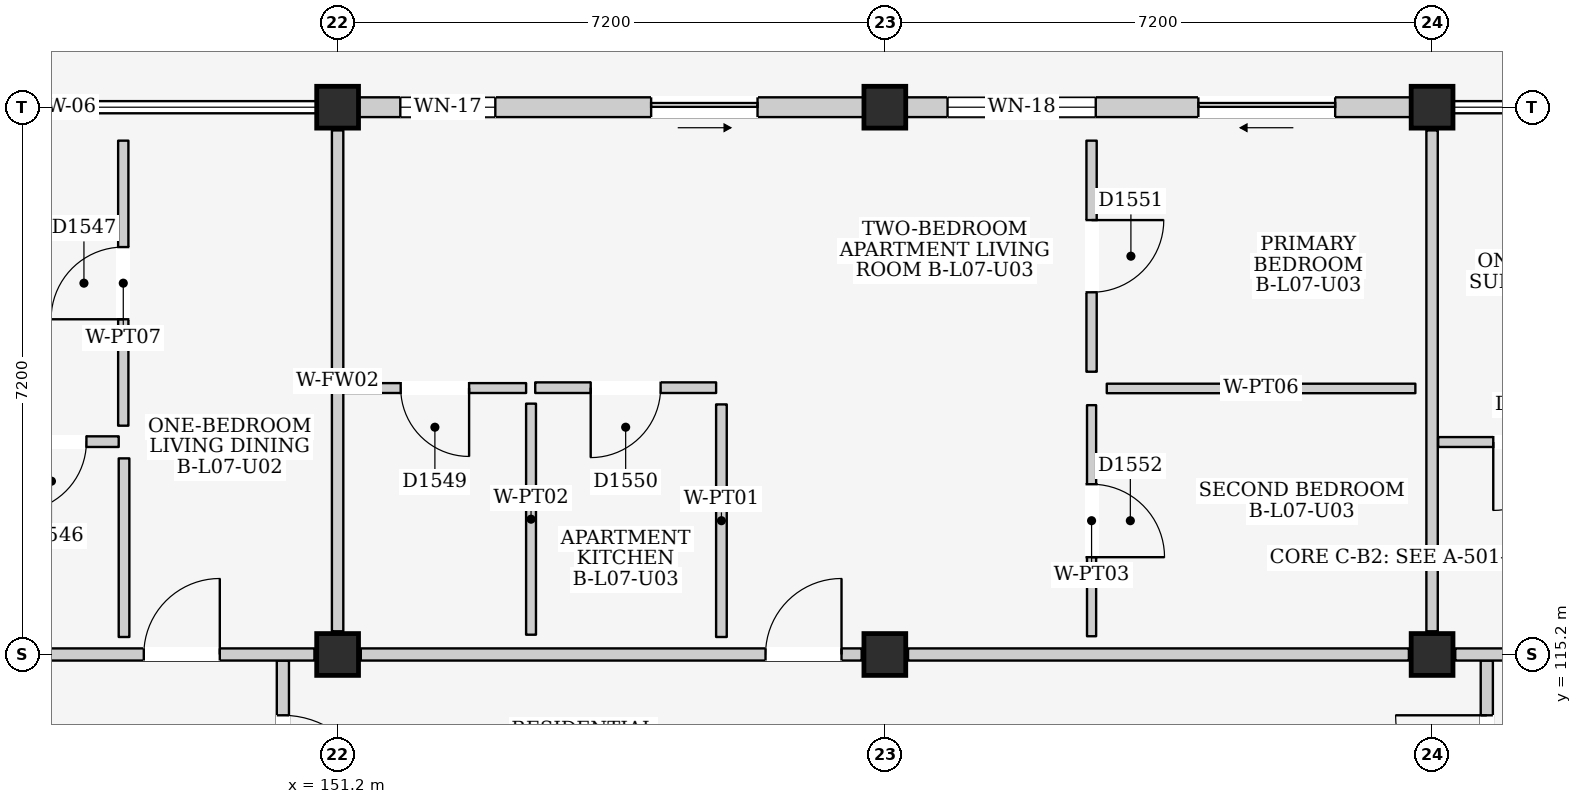
"""IFC4 building model, lengths in metres.
Left out: names, types, materials, properties, quantities, classifications, styles, units other than length and angle.
Written with IfcOpenShell. Run it as: python <this file> out.ifc"""

import sys

from ifc_helpers import new_model, si_unit, direction, frame, frame_2d, origin, origin_2d, place, context, subcontext, project, spatial, rectangle, extrude, element, fill, save


model = new_model("IFC4")
c1 = context("Model", 3, precision=1e-05, world=origin(), true_north=direction((0.0, 1.0)))
c2 = subcontext(c1, "Body", "Model", "MODEL_VIEW")
j1 = project(units=[si_unit("LENGTHUNIT", "METRE"), si_unit("PLANEANGLEUNIT", "RADIAN")], contexts=[c1])
p1 = place(None, origin())
s1 = spatial("IfcSite", under=j1, at=p1, CompositionType="ELEMENT")
p2 = place(p1, origin())
s2 = spatial("IfcBuilding", under=s1, at=p2, CompositionType="ELEMENT")
p3 = place(p2, frame((0.0, 0.0, 25.1)))
s3 = spatial("IfcBuildingStorey", under=s2, at=p3, CompositionType="ELEMENT", Elevation=25.1)
for number, where, z_axis, x_axis in (
    (1, (151.2, 115.2, 0.0), (0.0, 0.0, 1.0), (1.0, 0.0, 0.0)),
    (2, (151.2, 122.4, 0.0), (0.0, 0.0, 1.0), (1.0, 0.0, 0.0)),
    (3, (158.4, 115.2, 0.0), (0.0, 0.0, 1.0), (1.0, 0.0, 0.0)),
    (4, (158.4, 122.4, 0.0), (0.0, 0.0, 1.0), (1.0, 0.0, 0.0)),
    (5, (165.6, 115.2, 0.0), (0.0, 0.0, 1.0), (1.0, 0.0, 0.0)),
    (6, (165.6, 122.4, 0.0), (0.0, 0.0, 1.0), (1.0, 0.0, 0.0)),
):
    element("IfcColumn", number, at=place(p3, frame(where, z_axis=z_axis, x_axis=x_axis)), inside=s3, PredefinedType="COLUMN", context=c2, shape_type="SweptSolid", body=[
        extrude(rectangle(XDim=0.55, YDim=0.55, at=origin_2d()), origin(), (0.0, 0.0, 1.0), 3.2),
    ])
p4 = place(p3, frame((151.475, 122.4, 0.0), z_axis=(0.0, 0.0, 1.0), x_axis=(1.0, 0.0, 0.0)))
e7 = element("IfcWall", 7, at=p4, inside=s3, PredefinedType="ELEMENTEDWALL", context=c2, shape_type="SweptSolid", body=[
    extrude(rectangle(XDim=6.65, YDim=0.26, at=frame_2d((3.325, 0.0))), origin(), (0.0, 0.0, 1.0), 2.525),
])
p5 = place(p4, frame((3.85, 0.0, 0.0)))
e8 = element("IfcOpeningElement", 8, at=p5, cuts=e7, PredefinedType="OPENING", context=c2, shape_type="SweptSolid", body=[
    extrude(rectangle(XDim=1.4, YDim=2.1, at=frame_2d((0.7, 1.05))), frame((0.0, 0.145, 0.0), z_axis=(0.0, -1.0, 0.0), x_axis=(1.0, 0.0, 0.0)), (0.0, 0.0, 1.0), 0.29),
])
p6 = place(p4, frame((0.55, 0.0, 0.9)))
e9 = element("IfcOpeningElement", 9, at=p6, cuts=e7, PredefinedType="OPENING", context=c2, shape_type="SweptSolid", body=[
    extrude(rectangle(XDim=1.25, YDim=1.3, at=frame_2d((0.625, 0.65))), frame((0.0, 0.145, 0.0), z_axis=(0.0, -1.0, 0.0), x_axis=(1.0, 0.0, 0.0)), (0.0, 0.0, 1.0), 0.29),
])
p7 = place(p3, frame((158.675, 122.4, 0.0), z_axis=(0.0, 0.0, 1.0), x_axis=(1.0, 0.0, 0.0)))
e10 = element("IfcWall", 10, at=p7, inside=s3, PredefinedType="ELEMENTEDWALL", context=c2, shape_type="SweptSolid", body=[
    extrude(rectangle(XDim=6.65, YDim=0.26, at=frame_2d((3.325, 0.0))), origin(), (0.0, 0.0, 1.0), 2.525),
])
p8 = place(p7, frame((3.85, 0.0, 0.0)))
e11 = element("IfcOpeningElement", 11, at=p8, cuts=e10, PredefinedType="OPENING", context=c2, shape_type="SweptSolid", body=[
    extrude(rectangle(XDim=1.8, YDim=2.12, at=frame_2d((0.9, 1.06))), frame((0.0, 0.145, 0.0), z_axis=(0.0, -1.0, 0.0), x_axis=(1.0, 0.0, 0.0)), (0.0, 0.0, 1.0), 0.29),
])
p9 = place(p7, frame((0.55, 0.0, 0.865)))
e12 = element("IfcOpeningElement", 12, at=p9, cuts=e10, PredefinedType="OPENING", context=c2, shape_type="SweptSolid", body=[
    extrude(rectangle(XDim=1.95, YDim=1.55, at=frame_2d((0.975, 0.775))), frame((0.0, 0.145, 0.0), z_axis=(0.0, -1.0, 0.0), x_axis=(1.0, 0.0, 0.0)), (0.0, 0.0, 1.0), 0.29),
])
p10 = place(p3, frame((150.48, 111.1, 0.0), z_axis=(0.0, 0.0, 1.0), x_axis=(0.0, 1.0, 0.0)))
e13 = element("IfcWall", 13, at=p10, inside=s3, PredefinedType="PARTITIONING", context=c2, shape_type="SweptSolid", body=[
    extrude(rectangle(XDim=4.02, YDim=0.16, at=frame_2d((2.01, 0.0))), origin(), (0.0, 0.0, 1.0), 2.99),
])
p11 = place(p10, frame((2.1, 0.0, 0.0)))
e14 = element("IfcOpeningElement", 14, at=p11, cuts=e13, PredefinedType="OPENING", context=c2, shape_type="SweptSolid", body=[
    extrude(rectangle(XDim=1.2, YDim=2.2, at=frame_2d((0.6, 1.1))), frame((0.0, 0.095, 0.0), z_axis=(0.0, -1.0, 0.0), x_axis=(1.0, 0.0, 0.0)), (0.0, 0.0, 1.0), 0.19),
])
p12 = place(p3, frame((166.32, 110.8, 0.0), z_axis=(0.0, 0.0, 1.0), x_axis=(0.0, 1.0, 0.0)))
e15 = element("IfcWall", 15, at=p12, inside=s3, PredefinedType="PARTITIONING", context=c2, shape_type="SweptSolid", body=[
    extrude(rectangle(XDim=4.32, YDim=0.16, at=frame_2d((2.16, 0.0))), origin(), (0.0, 0.0, 1.0), 2.99),
])
p13 = place(p12, frame((2.4, 0.0, 0.0)))
e16 = element("IfcOpeningElement", 16, at=p13, cuts=e15, PredefinedType="OPENING", context=c2, shape_type="SweptSolid", body=[
    extrude(rectangle(XDim=1.2, YDim=2.2, at=frame_2d((0.6, 1.1))), frame((0.0, 0.095, 0.0), z_axis=(0.0, -1.0, 0.0), x_axis=(1.0, 0.0, 0.0)), (0.0, 0.0, 1.0), 0.19),
])
p14 = place(p3, frame((144.305, 115.2, 0.0), z_axis=(0.0, 0.0, 1.0), x_axis=(1.0, 0.0, 0.0)))
e17 = element("IfcWall", 17, at=p14, inside=s3, PredefinedType="PARTITIONING", context=c2, shape_type="SweptSolid", body=[
    extrude(rectangle(XDim=6.59, YDim=0.16, at=frame_2d((3.295, 0.0))), origin(), (0.0, 0.0, 1.0), 2.375),
])
p15 = place(p14, frame((4.345, 0.0, 0.0)))
e18 = element("IfcOpeningElement", 18, at=p15, cuts=e17, PredefinedType="OPENING", context=c2, shape_type="SweptSolid", body=[
    extrude(rectangle(XDim=1.0, YDim=2.15, at=frame_2d((0.5, 1.075))), frame((0.0, 0.095, 0.0), z_axis=(0.0, -1.0, 0.0), x_axis=(1.0, 0.0, 0.0)), (0.0, 0.0, 1.0), 0.19),
])
p16 = place(p3, frame((151.2, 115.505, 0.0), z_axis=(0.0, 0.0, 1.0), x_axis=(0.0, 1.0, 0.0)))
e19 = element("IfcWall", 19, at=p16, inside=s3, PredefinedType="PARTITIONING", context=c2, shape_type="SweptSolid", body=[
    extrude(rectangle(XDim=6.59, YDim=0.15, at=frame_2d((3.295, 0.0))), origin(), (0.0, 0.0, 1.0), 2.475),
])
p17 = place(p3, frame((146.55, 118.0, 0.0), z_axis=(0.0, 0.0, 1.0), x_axis=(1.0, 0.0, 0.0)))
e20 = element("IfcWall", 20, at=p17, inside=s3, PredefinedType="PARTITIONING", context=c2, shape_type="SweptSolid", body=[
    extrude(rectangle(XDim=1.77, YDim=0.14, at=frame_2d((0.885, 0.0))), origin(), (0.0, 0.0, 1.0), 2.99),
])
p18 = place(p17, frame((0.425, 0.0, 0.0)))
e21 = element("IfcOpeningElement", 21, at=p18, cuts=e20, PredefinedType="OPENING", context=c2, shape_type="SweptSolid", body=[
    extrude(rectangle(XDim=0.92, YDim=2.1, at=frame_2d((0.46, 1.05))), frame((0.0, 0.085, 0.0), z_axis=(0.0, -1.0, 0.0), x_axis=(1.0, 0.0, 0.0)), (0.0, 0.0, 1.0), 0.17),
])
p19 = place(p3, frame((148.39, 115.43, 0.0), z_axis=(0.0, 0.0, 1.0), x_axis=(0.0, 1.0, 0.0)))
e22 = element("IfcWall", 22, at=p19, inside=s3, PredefinedType="PARTITIONING", context=c2, shape_type="SweptSolid", body=[
    extrude(rectangle(XDim=2.35, YDim=0.14, at=frame_2d((1.175, 0.0))), origin(), (0.0, 0.0, 1.0), 2.99),
])
p20 = place(p3, frame((148.38, 118.21, 0.0), z_axis=(0.0, 0.0, 1.0), x_axis=(0.0, 1.0, 0.0)))
e23 = element("IfcWall", 23, at=p20, inside=s3, PredefinedType="PARTITIONING", context=c2, shape_type="SweptSolid", body=[
    extrude(rectangle(XDim=3.75, YDim=0.135, at=frame_2d((1.875, 0.0))), origin(), (0.0, 0.0, 1.0), 2.99),
])
p21 = place(p20, frame((1.4, 0.0, 0.0)))
e24 = element("IfcOpeningElement", 24, at=p21, cuts=e23, PredefinedType="OPENING", context=c2, shape_type="SweptSolid", body=[
    extrude(rectangle(XDim=0.95, YDim=2.15, at=frame_2d((0.475, 1.075))), frame((0.0, 0.083, 0.0), z_axis=(0.0, -1.0, 0.0), x_axis=(1.0, 0.0, 0.0)), (0.0, 0.0, 1.0), 0.165),
])
p22 = place(p3, frame((151.505, 115.2, 0.0), z_axis=(0.0, 0.0, 1.0), x_axis=(1.0, 0.0, 0.0)))
e25 = element("IfcWall", 25, at=p22, inside=s3, PredefinedType="PARTITIONING", context=c2, shape_type="SweptSolid", body=[
    extrude(rectangle(XDim=6.59, YDim=0.16, at=frame_2d((3.295, 0.0))), origin(), (0.0, 0.0, 1.0), 2.375),
])
p23 = place(p22, frame((5.325, 0.0, 0.0)))
e26 = element("IfcOpeningElement", 26, at=p23, cuts=e25, PredefinedType="OPENING", context=c2, shape_type="SweptSolid", body=[
    extrude(rectangle(XDim=1.0, YDim=2.15, at=frame_2d((0.5, 1.075))), frame((0.0, 0.095, 0.0), z_axis=(0.0, -1.0, 0.0), x_axis=(1.0, 0.0, 0.0)), (0.0, 0.0, 1.0), 0.19),
])
p24 = place(p3, frame((158.705, 115.2, 0.0), z_axis=(0.0, 0.0, 1.0), x_axis=(1.0, 0.0, 0.0)))
e27 = element("IfcWall", 27, at=p24, inside=s3, PredefinedType="PARTITIONING", context=c2, shape_type="SweptSolid", body=[
    extrude(rectangle(XDim=6.59, YDim=0.16, at=frame_2d((3.295, 0.0))), origin(), (0.0, 0.0, 1.0), 2.375),
])
p25 = place(p3, frame((165.6, 115.505, 0.0), z_axis=(0.0, 0.0, 1.0), x_axis=(0.0, 1.0, 0.0)))
e28 = element("IfcWall", 28, at=p25, inside=s3, PredefinedType="PARTITIONING", context=c2, shape_type="SweptSolid", body=[
    extrude(rectangle(XDim=6.59, YDim=0.15, at=frame_2d((3.295, 0.0))), origin(), (0.0, 0.0, 1.0), 2.475),
])
p26 = place(p3, frame((151.28, 118.705, 0.0), z_axis=(0.0, 0.0, 1.0), x_axis=(1.0, 0.0, 0.0)))
e29 = element("IfcWall", 29, at=p26, inside=s3, PredefinedType="PARTITIONING", context=c2, shape_type="SweptSolid", body=[
    extrude(rectangle(XDim=2.4, YDim=0.13, at=frame_2d((1.2, 0.0))), origin(), (0.0, 0.0, 1.0), 2.99),
])
p27 = place(p26, frame((0.75, 0.0, 0.0)))
e30 = element("IfcOpeningElement", 30, at=p27, cuts=e29, PredefinedType="OPENING", context=c2, shape_type="SweptSolid", body=[
    extrude(rectangle(XDim=0.9, YDim=2.1, at=frame_2d((0.45, 1.05))), frame((0.0, 0.08, 0.0), z_axis=(0.0, -1.0, 0.0), x_axis=(1.0, 0.0, 0.0)), (0.0, 0.0, 1.0), 0.16),
])
p28 = place(p3, frame((153.745, 115.46, 0.0), z_axis=(0.0, 0.0, 1.0), x_axis=(0.0, 1.0, 0.0)))
e31 = element("IfcWall", 31, at=p28, inside=s3, PredefinedType="PARTITIONING", context=c2, shape_type="SweptSolid", body=[
    extrude(rectangle(XDim=3.04, YDim=0.13, at=frame_2d((1.52, 0.0))), origin(), (0.0, 0.0, 1.0), 2.99),
])
p29 = place(p3, frame((153.8, 118.71, 0.0), z_axis=(0.0, 0.0, 1.0), x_axis=(1.0, 0.0, 0.0)))
e32 = element("IfcWall", 32, at=p29, inside=s3, PredefinedType="PARTITIONING", context=c2, shape_type="SweptSolid", body=[
    extrude(rectangle(XDim=2.38, YDim=0.14, at=frame_2d((1.19, 0.0))), origin(), (0.0, 0.0, 1.0), 2.99),
])
p30 = place(p29, frame((0.73, 0.0, 0.0)))
e33 = element("IfcOpeningElement", 33, at=p30, cuts=e32, PredefinedType="OPENING", context=c2, shape_type="SweptSolid", body=[
    extrude(rectangle(XDim=0.92, YDim=2.1, at=frame_2d((0.46, 1.05))), frame((0.0, 0.085, 0.0), z_axis=(0.0, -1.0, 0.0), x_axis=(1.0, 0.0, 0.0)), (0.0, 0.0, 1.0), 0.17),
])
p31 = place(p3, frame((156.25, 115.43, 0.0), z_axis=(0.0, 0.0, 1.0), x_axis=(0.0, 1.0, 0.0)))
e34 = element("IfcWall", 34, at=p31, inside=s3, PredefinedType="PARTITIONING", context=c2, shape_type="SweptSolid", body=[
    extrude(rectangle(XDim=3.06, YDim=0.14, at=frame_2d((1.53, 0.0))), origin(), (0.0, 0.0, 1.0), 2.99),
])
p32 = place(p3, frame((161.12, 118.92, 0.0), z_axis=(0.0, 0.0, 1.0), x_axis=(0.0, 1.0, 0.0)))
e35 = element("IfcWall", 35, at=p32, inside=s3, PredefinedType="PARTITIONING", context=c2, shape_type="SweptSolid", body=[
    extrude(rectangle(XDim=3.04, YDim=0.135, at=frame_2d((1.52, 0.0))), origin(), (0.0, 0.0, 1.0), 2.99),
])
p33 = place(p32, frame((1.045, 0.0, 0.0)))
e36 = element("IfcOpeningElement", 36, at=p33, cuts=e35, PredefinedType="OPENING", context=c2, shape_type="SweptSolid", body=[
    extrude(rectangle(XDim=0.95, YDim=2.15, at=frame_2d((0.475, 1.075))), frame((0.0, 0.083, 0.0), z_axis=(0.0, -1.0, 0.0), x_axis=(1.0, 0.0, 0.0)), (0.0, 0.0, 1.0), 0.165),
])
p34 = place(p3, frame((161.32, 118.7, 0.0), z_axis=(0.0, 0.0, 1.0), x_axis=(1.0, 0.0, 0.0)))
e37 = element("IfcWall", 37, at=p34, inside=s3, PredefinedType="PARTITIONING", context=c2, shape_type="SweptSolid", body=[
    extrude(rectangle(XDim=4.06, YDim=0.125, at=frame_2d((2.03, 0.0))), origin(), (0.0, 0.0, 1.0), 2.99),
])
p35 = place(p3, frame((161.12, 115.44, 0.0), z_axis=(0.0, 0.0, 1.0), x_axis=(0.0, 1.0, 0.0)))
e38 = element("IfcWall", 38, at=p35, inside=s3, PredefinedType="PARTITIONING", context=c2, shape_type="SweptSolid", body=[
    extrude(rectangle(XDim=3.04, YDim=0.12, at=frame_2d((1.52, 0.0))), origin(), (0.0, 0.0, 1.0), 2.99),
])
p36 = place(p35, frame((1.04, 0.0, 0.0)))
e39 = element("IfcOpeningElement", 39, at=p36, cuts=e38, PredefinedType="OPENING", context=c2, shape_type="SweptSolid", body=[
    extrude(rectangle(XDim=0.96, YDim=2.15, at=frame_2d((0.48, 1.075))), frame((0.0, 0.075, 0.0), z_axis=(0.0, -1.0, 0.0), x_axis=(1.0, 0.0, 0.0)), (0.0, 0.0, 1.0), 0.15),
])
p37 = place(p3, frame((165.905, 115.2, 0.0), z_axis=(0.0, 0.0, 1.0), x_axis=(1.0, 0.0, 0.0)))
e40 = element("IfcWall", 40, at=p37, inside=s3, PredefinedType="PARTITIONING", context=c2, shape_type="SweptSolid", body=[
    extrude(rectangle(XDim=6.59, YDim=0.16, at=frame_2d((3.295, 0.0))), origin(), (0.0, 0.0, 1.0), 2.375),
])
p38 = place(p37, frame((4.345, 0.0, 0.0)))
e41 = element("IfcOpeningElement", 41, at=p38, cuts=e40, PredefinedType="OPENING", context=c2, shape_type="SweptSolid", body=[
    extrude(rectangle(XDim=1.0, YDim=2.15, at=frame_2d((0.5, 1.075))), frame((0.0, 0.095, 0.0), z_axis=(0.0, -1.0, 0.0), x_axis=(1.0, 0.0, 0.0)), (0.0, 0.0, 1.0), 0.19),
])
p39 = place(p3, frame((165.68, 117.995, 0.0), z_axis=(0.0, 0.0, 1.0), x_axis=(1.0, 0.0, 0.0)))
e42 = element("IfcWall", 42, at=p39, inside=s3, PredefinedType="PARTITIONING", context=c2, shape_type="SweptSolid", body=[
    extrude(rectangle(XDim=2.35, YDim=0.13, at=frame_2d((1.175, 0.0))), origin(), (0.0, 0.0, 1.0), 2.99),
])
p40 = place(p39, frame((0.725, 0.0, 0.0)))
e43 = element("IfcOpeningElement", 43, at=p40, cuts=e42, PredefinedType="OPENING", context=c2, shape_type="SweptSolid", body=[
    extrude(rectangle(XDim=0.9, YDim=2.1, at=frame_2d((0.45, 1.05))), frame((0.0, 0.08, 0.0), z_axis=(0.0, -1.0, 0.0), x_axis=(1.0, 0.0, 0.0)), (0.0, 0.0, 1.0), 0.16),
])
p41 = place(p5, frame((1.4, 0.0, 0.0), z_axis=(0.0, 0.0, 1.0), x_axis=(-1.0, 0.0, 0.0)))
e44 = element("IfcDoor", 44, at=p41, inside=s3, OperationType="SLIDING_TO_RIGHT", PredefinedType="DOOR", context=c2, shape_type="SweptSolid", body=[
    extrude(rectangle(XDim=1.4, YDim=2.1, at=frame_2d((0.7, 1.05))), frame((0.0, 0.025, 0.0), z_axis=(0.0, -1.0, 0.0), x_axis=(1.0, 0.0, 0.0)), (0.0, 0.0, 1.0), 0.05),
])
fill(e8, e44)
p42 = place(p6, origin())
e45 = element("IfcWindow", 45, at=p42, inside=s3, PartitioningType="SINGLE_PANEL", PredefinedType="WINDOW", context=c2, shape_type="SweptSolid", body=[
    extrude(rectangle(XDim=1.25, YDim=1.3, at=frame_2d((0.625, 0.65))), frame((0.0, 0.03, 0.0), z_axis=(0.0, -1.0, 0.0), x_axis=(1.0, 0.0, 0.0)), (0.0, 0.0, 1.0), 0.06),
])
fill(e9, e45)
p43 = place(p8, frame((1.8, 0.0, 0.0), z_axis=(0.0, 0.0, 1.0), x_axis=(-1.0, 0.0, 0.0)))
e46 = element("IfcDoor", 46, at=p43, inside=s3, OperationType="SLIDING_TO_LEFT", PredefinedType="DOOR", context=c2, shape_type="SweptSolid", body=[
    extrude(rectangle(XDim=1.8, YDim=2.12, at=frame_2d((0.9, 1.06))), frame((0.0, 0.025, 0.0), z_axis=(0.0, -1.0, 0.0), x_axis=(1.0, 0.0, 0.0)), (0.0, 0.0, 1.0), 0.05),
])
fill(e11, e46)
p44 = place(p9, origin())
e47 = element("IfcWindow", 47, at=p44, inside=s3, PartitioningType="DOUBLE_PANEL_VERTICAL", PredefinedType="WINDOW", context=c2, shape_type="SweptSolid", body=[
    extrude(rectangle(XDim=1.95, YDim=1.55, at=frame_2d((0.975, 0.775))), frame((0.0, 0.03, 0.0), z_axis=(0.0, -1.0, 0.0), x_axis=(1.0, 0.0, 0.0)), (0.0, 0.0, 1.0), 0.06),
])
fill(e12, e47)
p45 = place(p11, frame((1.2, 0.0, 0.0), z_axis=(0.0, 0.0, 1.0), x_axis=(-1.0, 0.0, 0.0)))
e48 = element("IfcDoor", 48, at=p45, inside=s3, OperationType="SINGLE_SWING_RIGHT", PredefinedType="DOOR", context=c2, shape_type="SweptSolid", body=[
    extrude(rectangle(XDim=1.2, YDim=2.2, at=frame_2d((0.6, 1.1))), frame((0.0, 0.025, 0.0), z_axis=(0.0, -1.0, 0.0), x_axis=(1.0, 0.0, 0.0)), (0.0, 0.0, 1.0), 0.05),
])
fill(e14, e48)
p46 = place(p13, origin())
e49 = element("IfcDoor", 49, at=p46, inside=s3, OperationType="SINGLE_SWING_RIGHT", PredefinedType="DOOR", context=c2, shape_type="SweptSolid", body=[
    extrude(rectangle(XDim=1.2, YDim=2.2, at=frame_2d((0.6, 1.1))), frame((0.0, 0.025, 0.0), z_axis=(0.0, -1.0, 0.0), x_axis=(1.0, 0.0, 0.0)), (0.0, 0.0, 1.0), 0.05),
])
fill(e16, e49)
p47 = place(p15, origin())
e50 = element("IfcDoor", 50, at=p47, inside=s3, OperationType="SINGLE_SWING_RIGHT", PredefinedType="DOOR", context=c2, shape_type="SweptSolid", body=[
    extrude(rectangle(XDim=1.0, YDim=2.15, at=frame_2d((0.5, 1.075))), frame((0.0, 0.025, 0.0), z_axis=(0.0, -1.0, 0.0), x_axis=(1.0, 0.0, 0.0)), (0.0, 0.0, 1.0), 0.05),
])
fill(e18, e50)
p48 = place(p18, frame((0.92, 0.0, 0.0), z_axis=(0.0, 0.0, 1.0), x_axis=(-1.0, 0.0, 0.0)))
e51 = element("IfcDoor", 51, at=p48, inside=s3, OperationType="SINGLE_SWING_RIGHT", PredefinedType="DOOR", context=c2, shape_type="SweptSolid", body=[
    extrude(rectangle(XDim=0.92, YDim=2.1, at=frame_2d((0.46, 1.05))), frame((0.0, 0.025, 0.0), z_axis=(0.0, -1.0, 0.0), x_axis=(1.0, 0.0, 0.0)), (0.0, 0.0, 1.0), 0.05),
])
fill(e21, e51)
p49 = place(p21, origin())
e52 = element("IfcDoor", 52, at=p49, inside=s3, OperationType="SINGLE_SWING_LEFT", PredefinedType="DOOR", context=c2, shape_type="SweptSolid", body=[
    extrude(rectangle(XDim=0.95, YDim=2.15, at=frame_2d((0.475, 1.075))), frame((0.0, 0.025, 0.0), z_axis=(0.0, -1.0, 0.0), x_axis=(1.0, 0.0, 0.0)), (0.0, 0.0, 1.0), 0.05),
])
fill(e24, e52)
p50 = place(p23, origin())
e53 = element("IfcDoor", 53, at=p50, inside=s3, OperationType="SINGLE_SWING_RIGHT", PredefinedType="DOOR", context=c2, shape_type="SweptSolid", body=[
    extrude(rectangle(XDim=1.0, YDim=2.15, at=frame_2d((0.5, 1.075))), frame((0.0, 0.025, 0.0), z_axis=(0.0, -1.0, 0.0), x_axis=(1.0, 0.0, 0.0)), (0.0, 0.0, 1.0), 0.05),
])
fill(e26, e53)
p51 = place(p27, frame((0.9, 0.0, 0.0), z_axis=(0.0, 0.0, 1.0), x_axis=(-1.0, 0.0, 0.0)))
e54 = element("IfcDoor", 54, at=p51, inside=s3, OperationType="SINGLE_SWING_LEFT", PredefinedType="DOOR", context=c2, shape_type="SweptSolid", body=[
    extrude(rectangle(XDim=0.9, YDim=2.1, at=frame_2d((0.45, 1.05))), frame((0.0, 0.025, 0.0), z_axis=(0.0, -1.0, 0.0), x_axis=(1.0, 0.0, 0.0)), (0.0, 0.0, 1.0), 0.05),
])
fill(e30, e54)
p52 = place(p30, frame((0.92, 0.0, 0.0), z_axis=(0.0, 0.0, 1.0), x_axis=(-1.0, 0.0, 0.0)))
e55 = element("IfcDoor", 55, at=p52, inside=s3, OperationType="SINGLE_SWING_RIGHT", PredefinedType="DOOR", context=c2, shape_type="SweptSolid", body=[
    extrude(rectangle(XDim=0.92, YDim=2.1, at=frame_2d((0.46, 1.05))), frame((0.0, 0.025, 0.0), z_axis=(0.0, -1.0, 0.0), x_axis=(1.0, 0.0, 0.0)), (0.0, 0.0, 1.0), 0.05),
])
fill(e33, e55)
p53 = place(p33, frame((0.95, 0.0, 0.0), z_axis=(0.0, 0.0, 1.0), x_axis=(-1.0, 0.0, 0.0)))
e56 = element("IfcDoor", 56, at=p53, inside=s3, OperationType="SINGLE_SWING_LEFT", PredefinedType="DOOR", context=c2, shape_type="SweptSolid", body=[
    extrude(rectangle(XDim=0.95, YDim=2.15, at=frame_2d((0.475, 1.075))), frame((0.0, 0.025, 0.0), z_axis=(0.0, -1.0, 0.0), x_axis=(1.0, 0.0, 0.0)), (0.0, 0.0, 1.0), 0.05),
])
fill(e36, e56)
p54 = place(p36, frame((0.96, 0.0, 0.0), z_axis=(0.0, 0.0, 1.0), x_axis=(-1.0, 0.0, 0.0)))
e57 = element("IfcDoor", 57, at=p54, inside=s3, OperationType="SINGLE_SWING_RIGHT", PredefinedType="DOOR", context=c2, shape_type="SweptSolid", body=[
    extrude(rectangle(XDim=0.96, YDim=2.15, at=frame_2d((0.48, 1.075))), frame((0.0, 0.025, 0.0), z_axis=(0.0, -1.0, 0.0), x_axis=(1.0, 0.0, 0.0)), (0.0, 0.0, 1.0), 0.05),
])
fill(e39, e57)
p55 = place(p40, frame((0.9, 0.0, 0.0), z_axis=(0.0, 0.0, 1.0), x_axis=(-1.0, 0.0, 0.0)))
e58 = element("IfcDoor", 58, at=p55, inside=s3, OperationType="SINGLE_SWING_RIGHT", PredefinedType="DOOR", context=c2, shape_type="SweptSolid", body=[
    extrude(rectangle(XDim=0.9, YDim=2.1, at=frame_2d((0.45, 1.05))), frame((0.0, 0.025, 0.0), z_axis=(0.0, -1.0, 0.0), x_axis=(1.0, 0.0, 0.0)), (0.0, 0.0, 1.0), 0.05),
])
fill(e43, e58)
save(model, sys.argv[1])
